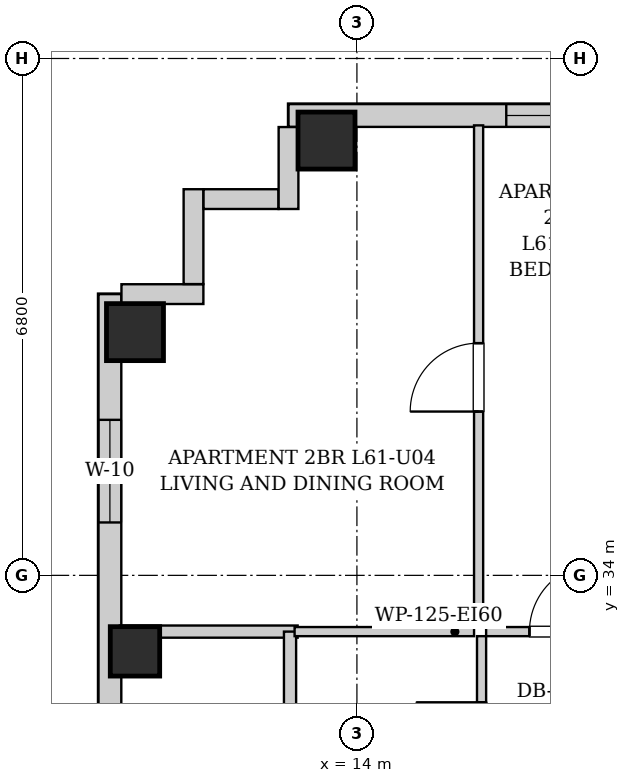
"""IFC4 building model, lengths in metres.
Left out: names, types, materials, properties, quantities, classifications, styles, units other than length and angle.
Written with IfcOpenShell. Run it as: python <this file> out.ifc"""

import sys

from ifc_helpers import new_model, si_unit, direction, frame, frame_2d, origin, origin_2d, place, context, subcontext, project, spatial, rectangle, extrude, element, fill, save


model = new_model("IFC4")
c1 = context("Model", 3, precision=1e-05, world=origin(), true_north=direction((0.0, 1.0)))
c2 = subcontext(c1, "Body", "Model", "MODEL_VIEW")
j1 = project(units=[si_unit("LENGTHUNIT", "METRE"), si_unit("PLANEANGLEUNIT", "RADIAN")], contexts=[c1])
p1 = place(None, origin())
s1 = spatial("IfcSite", under=j1, at=p1, CompositionType="ELEMENT")
p2 = place(p1, origin())
s2 = spatial("IfcBuilding", under=s1, at=p2, CompositionType="ELEMENT")
p3 = place(p2, frame((0.0, 0.0, 210.7)))
s3 = spatial("IfcBuildingStorey", under=s2, at=p3, CompositionType="ELEMENT", Elevation=210.7)
p4 = place(p3, frame((13.6, 39.72, 0.0), z_axis=(0.0, 0.0, 1.0), x_axis=(1.0, 0.0, 0.0)))
e1 = element("IfcColumn", 1, at=p4, inside=s3, PredefinedType="COLUMN", context=c2, shape_type="SweptSolid", body=[
    extrude(rectangle(XDim=0.75, YDim=0.75, at=origin_2d()), origin(), (0.0, 0.0, 1.0), 3.3),
])
p5 = place(p3, frame((11.08, 33.0, 0.0), z_axis=(0.0, 0.0, 1.0), x_axis=(1.0, 0.0, 0.0)))
e2 = element("IfcColumn", 2, at=p5, inside=s3, PredefinedType="COLUMN", context=c2, shape_type="SweptSolid", body=[
    extrude(rectangle(XDim=0.65, YDim=0.65, at=origin_2d()), origin(), (0.0, 0.0, 1.0), 3.3),
])
p6 = place(p3, frame((11.08, 37.2, 0.0), z_axis=(0.0, 0.0, 1.0), x_axis=(1.0, 0.0, 0.0)))
e3 = element("IfcColumn", 3, at=p6, inside=s3, PredefinedType="COLUMN", context=c2, shape_type="SweptSolid", body=[
    extrude(rectangle(XDim=0.75, YDim=0.75, at=origin_2d()), origin(), (0.0, 0.0, 1.0), 3.3),
])
p7 = place(p3, frame((13.1, 40.05, 0.0), z_axis=(0.0, 0.0, 1.0), x_axis=(1.0, 0.0, 0.0)))
e4 = element("IfcWall", 4, at=p7, inside=s3, PredefinedType="SOLIDWALL", context=c2, shape_type="SweptSolid", body=[
    extrude(rectangle(XDim=16.95, YDim=0.3, at=frame_2d((8.475, 0.0))), origin(), (0.0, 0.0, 1.0), 3.04),
])
p8 = place(p7, frame((2.865, 0.0, 0.55)))
e5 = element("IfcOpeningElement", 5, at=p8, cuts=e4, PredefinedType="OPENING", context=c2, shape_type="SweptSolid", body=[
    extrude(rectangle(XDim=1.35, YDim=1.2, at=frame_2d((0.675, 0.6))), frame((0.0, 0.16, 0.0), z_axis=(0.0, -1.0, 0.0), x_axis=(1.0, 0.0, 0.0)), (0.0, 0.0, 1.0), 0.32),
])
p9 = place(p7, frame((5.85, 0.0, 0.55)))
e6 = element("IfcOpeningElement", 6, at=p9, cuts=e4, PredefinedType="OPENING", context=c2, shape_type="SweptSolid", body=[
    extrude(rectangle(XDim=1.35, YDim=1.2, at=frame_2d((0.675, 0.6))), frame((0.0, 0.16, 0.0), z_axis=(0.0, -1.0, 0.0), x_axis=(1.0, 0.0, 0.0)), (0.0, 0.0, 1.0), 0.32),
])
p10 = place(p7, frame((8.72, 0.0, 0.55)))
e7 = element("IfcOpeningElement", 7, at=p10, cuts=e4, PredefinedType="OPENING", context=c2, shape_type="SweptSolid", body=[
    extrude(rectangle(XDim=0.68, YDim=1.2, at=frame_2d((0.34, 0.6))), frame((0.0, 0.16, 0.0), z_axis=(0.0, -1.0, 0.0), x_axis=(1.0, 0.0, 0.0)), (0.0, 0.0, 1.0), 0.32),
])
p11 = place(p7, frame((14.55, 0.0, 0.55)))
e8 = element("IfcOpeningElement", 8, at=p11, cuts=e4, PredefinedType="OPENING", context=c2, shape_type="SweptSolid", body=[
    extrude(rectangle(XDim=1.35, YDim=1.2, at=frame_2d((0.675, 0.6))), frame((0.0, 0.16, 0.0), z_axis=(0.0, -1.0, 0.0), x_axis=(1.0, 0.0, 0.0)), (0.0, 0.0, 1.0), 0.32),
])
p12 = place(p3, frame((10.75, 6.3, 0.0), z_axis=(0.0, 0.0, 1.0), x_axis=(0.0, 1.0, 0.0)))
e9 = element("IfcWall", 9, at=p12, inside=s3, PredefinedType="SOLIDWALL", context=c2, shape_type="SweptSolid", body=[
    extrude(rectangle(XDim=31.4, YDim=0.3, at=frame_2d((15.7, 0.0))), origin(), (0.0, 0.0, 1.0), 3.04),
])
p13 = place(p12, frame((28.396, 0.0, 0.55)))
e10 = element("IfcOpeningElement", 10, at=p13, cuts=e9, PredefinedType="OPENING", context=c2, shape_type="SweptSolid", body=[
    extrude(rectangle(XDim=1.35, YDim=1.2, at=frame_2d((0.675, 0.6))), frame((0.0, 0.16, 0.0), z_axis=(0.0, -1.0, 0.0), x_axis=(1.0, 0.0, 0.0)), (0.0, 0.0, 1.0), 0.32),
])
p14 = place(p12, frame((10.367, 0.0, 0.55)))
e11 = element("IfcOpeningElement", 11, at=p14, cuts=e9, PredefinedType="OPENING", context=c2, shape_type="SweptSolid", body=[
    extrude(rectangle(XDim=1.35, YDim=1.2, at=frame_2d((0.675, 0.6))), frame((0.0, 0.16, 0.0), z_axis=(0.0, -1.0, 0.0), x_axis=(1.0, 0.0, 0.0)), (0.0, 0.0, 1.0), 0.32),
])
p15 = place(p12, frame((19.683, 0.0, 0.55)))
e12 = element("IfcOpeningElement", 12, at=p15, cuts=e9, PredefinedType="OPENING", context=c2, shape_type="SweptSolid", body=[
    extrude(rectangle(XDim=1.35, YDim=1.2, at=frame_2d((0.675, 0.6))), frame((0.0, 0.16, 0.0), z_axis=(0.0, -1.0, 0.0), x_axis=(1.0, 0.0, 0.0)), (0.0, 0.0, 1.0), 0.32),
])
p16 = place(p3, frame((10.902, 37.7, 0.0), z_axis=(0.0, 0.0, 1.0), x_axis=(1.0, 0.0, 0.0)))
e13 = element("IfcWall", 13, at=p16, inside=s3, PredefinedType="SOLIDWALL", context=c2, shape_type="SweptSolid", body=[
    extrude(rectangle(XDim=1.078, YDim=0.26, at=frame_2d((0.539, 0.0))), origin(), (0.0, 0.0, 1.0), 3.04),
])
p17 = place(p3, frame((11.85, 37.832, 0.0), z_axis=(0.0, 0.0, 1.0), x_axis=(0.0, 1.0, 0.0)))
e14 = element("IfcWall", 14, at=p17, inside=s3, PredefinedType="SOLIDWALL", context=c2, shape_type="SweptSolid", body=[
    extrude(rectangle(XDim=1.248, YDim=0.26, at=frame_2d((0.624, 0.0))), origin(), (0.0, 0.0, 1.0), 3.04),
])
p18 = place(p3, frame((11.982, 38.95, 0.0), z_axis=(0.0, 0.0, 1.0), x_axis=(1.0, 0.0, 0.0)))
e15 = element("IfcWall", 15, at=p18, inside=s3, PredefinedType="SOLIDWALL", context=c2, shape_type="SweptSolid", body=[
    extrude(rectangle(XDim=0.986, YDim=0.26, at=frame_2d((0.493, 0.0))), origin(), (0.0, 0.0, 1.0), 3.04),
])
p19 = place(p3, frame((13.1, 38.82, 0.0), z_axis=(0.0, 0.0, 1.0), x_axis=(0.0, 1.0, 0.0)))
e16 = element("IfcWall", 16, at=p19, inside=s3, PredefinedType="SOLIDWALL", context=c2, shape_type="SweptSolid", body=[
    extrude(rectangle(XDim=1.078, YDim=0.26, at=frame_2d((0.539, 0.0))), origin(), (0.0, 0.0, 1.0), 3.04),
])
p20 = place(p3, frame((10.88, 33.26, 0.0), z_axis=(0.0, 0.0, 1.0), x_axis=(1.0, 0.0, 0.0)))
e17 = element("IfcWall", 17, at=p20, inside=s3, PredefinedType="PARTITIONING", context=c2, shape_type="SweptSolid", body=[
    extrude(rectangle(XDim=2.34, YDim=0.16, at=frame_2d((1.17, 0.0))), origin(), (0.0, 0.0, 1.0), 3.04),
])
p21 = place(p3, frame((13.12, 30.6, 0.0), z_axis=(0.0, 0.0, 1.0), x_axis=(0.0, 1.0, 0.0)))
e18 = element("IfcWall", 18, at=p21, inside=s3, PredefinedType="PARTITIONING", context=c2, shape_type="SweptSolid", body=[
    extrude(rectangle(XDim=2.66, YDim=0.16, at=frame_2d((1.33, 0.0))), origin(), (0.0, 0.0, 1.0), 3.04),
])
p22 = place(p3, frame((15.64, 30.6, 0.0), z_axis=(0.0, 0.0, 1.0), x_axis=(0.0, 1.0, 0.0)))
e19 = element("IfcWall", 19, at=p22, inside=s3, PredefinedType="PARTITIONING", context=c2, shape_type="SweptSolid", body=[
    extrude(rectangle(XDim=2.6, YDim=0.12, at=frame_2d((1.3, 0.0))), origin(), (0.0, 0.0, 1.0), 3.04),
])
p23 = place(p22, frame((0.87, 0.0, 0.0)))
e20 = element("IfcOpeningElement", 20, at=p23, cuts=e19, PredefinedType="OPENING", context=c2, shape_type="SweptSolid", body=[
    extrude(rectangle(XDim=0.86, YDim=2.05, at=frame_2d((0.43, 1.025))), frame((0.0, 0.07, 0.0), z_axis=(0.0, -1.0, 0.0), x_axis=(1.0, 0.0, 0.0)), (0.0, 0.0, 1.0), 0.14),
])
p24 = place(p3, frame((13.18, 33.26, 0.0), z_axis=(0.0, 0.0, 1.0), x_axis=(1.0, 0.0, 0.0)))
e21 = element("IfcWall", 21, at=p24, inside=s3, PredefinedType="PARTITIONING", context=c2, shape_type="SweptSolid", body=[
    extrude(rectangle(XDim=2.361, YDim=0.12, at=frame_2d((1.181, 0.0))), origin(), (0.0, 0.0, 1.0), 3.04),
])
p25 = place(p3, frame((15.7, 33.26, 0.0), z_axis=(0.0, 0.0, 1.0), x_axis=(1.0, 0.0, 0.0)))
e22 = element("IfcWall", 22, at=p25, inside=s3, PredefinedType="PARTITIONING", context=c2, shape_type="SweptSolid", body=[
    extrude(rectangle(XDim=2.04, YDim=0.12, at=frame_2d((1.02, 0.0))), origin(), (0.0, 0.0, 1.0), 3.04),
])
p26 = place(p25, frame((0.57, 0.0, 0.0)))
e23 = element("IfcOpeningElement", 23, at=p26, cuts=e22, PredefinedType="OPENING", context=c2, shape_type="SweptSolid", body=[
    extrude(rectangle(XDim=0.9, YDim=2.05, at=frame_2d((0.45, 1.025))), frame((0.0, 0.07, 0.0), z_axis=(0.0, -1.0, 0.0), x_axis=(1.0, 0.0, 0.0)), (0.0, 0.0, 1.0), 0.14),
])
p27 = place(p3, frame((15.601, 33.32, 0.0), z_axis=(0.0, 0.0, 1.0), x_axis=(0.0, 1.0, 0.0)))
e24 = element("IfcWall", 24, at=p27, inside=s3, PredefinedType="PARTITIONING", context=c2, shape_type="SweptSolid", body=[
    extrude(rectangle(XDim=6.6, YDim=0.12, at=frame_2d((3.3, 0.0))), origin(), (0.0, 0.0, 1.0), 3.04),
])
p28 = place(p27, frame((2.835, 0.0, 0.0)))
e25 = element("IfcOpeningElement", 25, at=p28, cuts=e24, PredefinedType="OPENING", context=c2, shape_type="SweptSolid", body=[
    extrude(rectangle(XDim=0.9, YDim=2.05, at=frame_2d((0.45, 1.025))), frame((0.0, 0.07, 0.0), z_axis=(0.0, -1.0, 0.0), x_axis=(1.0, 0.0, 0.0)), (0.0, 0.0, 1.0), 0.14),
])
p29 = place(p23, origin())
e26 = element("IfcDoor", 26, at=p29, inside=s3, OperationType="SINGLE_SWING_RIGHT", PredefinedType="DOOR", context=c2, shape_type="SweptSolid", body=[
    extrude(rectangle(XDim=0.86, YDim=2.05, at=frame_2d((0.43, 1.025))), frame((0.0, 0.025, 0.0), z_axis=(0.0, -1.0, 0.0), x_axis=(1.0, 0.0, 0.0)), (0.0, 0.0, 1.0), 0.05),
])
fill(e20, e26)
p30 = place(p26, origin())
e27 = element("IfcDoor", 27, at=p30, inside=s3, OperationType="SINGLE_SWING_RIGHT", PredefinedType="DOOR", context=c2, shape_type="SweptSolid", body=[
    extrude(rectangle(XDim=0.9, YDim=2.05, at=frame_2d((0.45, 1.025))), frame((0.0, 0.025, 0.0), z_axis=(0.0, -1.0, 0.0), x_axis=(1.0, 0.0, 0.0)), (0.0, 0.0, 1.0), 0.05),
])
fill(e23, e27)
p31 = place(p28, origin())
e28 = element("IfcDoor", 28, at=p31, inside=s3, OperationType="SINGLE_SWING_LEFT", PredefinedType="DOOR", context=c2, shape_type="SweptSolid", body=[
    extrude(rectangle(XDim=0.9, YDim=2.05, at=frame_2d((0.45, 1.025))), frame((0.0, 0.025, 0.0), z_axis=(0.0, -1.0, 0.0), x_axis=(1.0, 0.0, 0.0)), (0.0, 0.0, 1.0), 0.05),
])
fill(e25, e28)
p32 = place(p13, origin())
e29 = element("IfcWindow", 29, at=p32, inside=s3, PartitioningType="SINGLE_PANEL", PredefinedType="WINDOW", context=c2, shape_type="SweptSolid", body=[
    extrude(rectangle(XDim=1.35, YDim=1.2, at=frame_2d((0.675, 0.6))), frame((0.0, 0.03, 0.0), z_axis=(0.0, -1.0, 0.0), x_axis=(1.0, 0.0, 0.0)), (0.0, 0.0, 1.0), 0.06),
])
fill(e10, e29)
p33 = place(p8, origin())
e30 = element("IfcWindow", 30, at=p33, inside=s3, PartitioningType="SINGLE_PANEL", PredefinedType="WINDOW", context=c2, shape_type="SweptSolid", body=[
    extrude(rectangle(XDim=1.35, YDim=1.2, at=frame_2d((0.675, 0.6))), frame((0.0, 0.03, 0.0), z_axis=(0.0, -1.0, 0.0), x_axis=(1.0, 0.0, 0.0)), (0.0, 0.0, 1.0), 0.06),
])
fill(e5, e30)
save(model, sys.argv[1])
